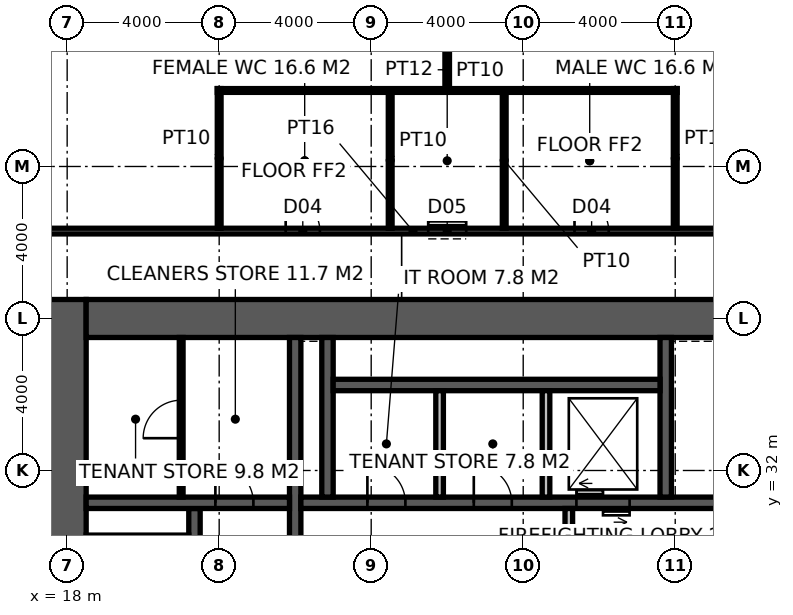
"""IFC4 building model, lengths in metres.
Left out: names, types, materials, properties, quantities, classifications, styles, units other than length and angle.
Written with IfcOpenShell. Run it as: python <this file> out.ifc"""

import sys

from ifc_helpers import new_model, si_unit, direction, frame, frame_2d, origin, place, context, subcontext, project, spatial, rectangle, extrude, element, fill, save


model = new_model("IFC4")
c1 = context("Model", 3, precision=1e-05, world=origin(), true_north=direction((0.0, 1.0)))
c2 = subcontext(c1, "Body", "Model", "MODEL_VIEW")
j1 = project(units=[si_unit("LENGTHUNIT", "METRE"), si_unit("PLANEANGLEUNIT", "RADIAN")], contexts=[c1])
p1 = place(None, origin())
s1 = spatial("IfcSite", under=j1, at=p1, CompositionType="ELEMENT")
p2 = place(p1, origin())
s2 = spatial("IfcBuilding", under=s1, at=p2, CompositionType="ELEMENT")
p3 = place(p2, frame((0.0, 0.0, 298.2)))
s3 = spatial("IfcBuildingStorey", under=s2, at=p3, CompositionType="ELEMENT", Elevation=298.2)
p4 = place(p3, frame((18.0, 17.5, -0.15), z_axis=(0.0, 0.0, 1.0), x_axis=(0.0, 1.0, 0.0)))
e1 = element("IfcWall", 1, at=p4, inside=s3, PredefinedType="SHEAR", context=c2, shape_type="SweptSolid", body=[
    extrude(rectangle(XDim=19.0, YDim=1.0, at=frame_2d((9.5, 0.0))), origin(), (0.0, 0.0, 1.0), 5.85),
])
p5 = place(p3, frame((18.5, 36.0, -0.15), z_axis=(0.0, 0.0, 1.0), x_axis=(1.0, 0.0, 0.0)))
e2 = element("IfcWall", 2, at=p5, inside=s3, PredefinedType="SHEAR", context=c2, shape_type="SweptSolid", body=[
    extrude(rectangle(XDim=17.6, YDim=1.0, at=frame_2d((8.8, 0.0))), origin(), (0.0, 0.0, 1.0), 5.85),
])
p6 = place(p3, frame((24.0, 18.5, -0.15), z_axis=(0.0, 0.0, 1.0), x_axis=(0.0, 1.0, 0.0)))
e3 = element("IfcWall", 3, at=p6, inside=s3, PredefinedType="SHEAR", context=c2, shape_type="SweptSolid", body=[
    extrude(rectangle(XDim=17.0, YDim=0.3, at=frame_2d((8.5, 0.0))), origin(), (0.0, 0.0, 1.0), 5.85),
])
p7 = place(p6, frame((9.6, 0.0, 0.15)))
e4 = element("IfcOpeningElement", 4, at=p7, cuts=e3, PredefinedType="OPENING", context=c2, shape_type="SweptSolid", body=[
    extrude(rectangle(XDim=1.5, YDim=2.4, at=frame_2d((0.75, 1.2))), frame((0.0, 0.16, 0.0), z_axis=(0.0, -1.0, 0.0), x_axis=(1.0, 0.0, 0.0)), (0.0, 0.0, 1.0), 0.32),
])
p8 = place(p3, frame((24.15, 31.15, -0.15), z_axis=(0.0, 0.0, 1.0), x_axis=(1.0, 0.0, 0.0)))
e5 = element("IfcWall", 5, at=p8, inside=s3, PredefinedType="SHEAR", context=c2, shape_type="SweptSolid", body=[
    extrude(rectangle(XDim=11.25, YDim=0.3, at=frame_2d((5.625, 0.0))), origin(), (0.0, 0.0, 1.0), 5.85),
])
p9 = place(p8, frame((1.75, 0.0, 0.15)))
e6 = element("IfcOpeningElement", 6, at=p9, cuts=e5, PredefinedType="OPENING", context=c2, shape_type="SweptSolid", body=[
    extrude(rectangle(XDim=1.0, YDim=2.2, at=frame_2d((0.5, 1.1))), frame((0.0, 0.16, 0.0), z_axis=(0.0, -1.0, 0.0), x_axis=(1.0, 0.0, 0.0)), (0.0, 0.0, 1.0), 0.32),
])
p10 = place(p8, frame((4.55, 0.0, 0.15)))
e7 = element("IfcOpeningElement", 7, at=p10, cuts=e5, PredefinedType="OPENING", context=c2, shape_type="SweptSolid", body=[
    extrude(rectangle(XDim=1.0, YDim=2.2, at=frame_2d((0.5, 1.1))), frame((0.0, 0.16, 0.0), z_axis=(0.0, -1.0, 0.0), x_axis=(1.0, 0.0, 0.0)), (0.0, 0.0, 1.0), 0.32),
])
p11 = place(p8, frame((7.25, 0.0, 0.15)))
e8 = element("IfcOpeningElement", 8, at=p11, cuts=e5, PredefinedType="OPENING", context=c2, shape_type="SweptSolid", body=[
    extrude(rectangle(XDim=1.4, YDim=2.4, at=frame_2d((0.7, 1.2))), frame((0.0, 0.16, 0.0), z_axis=(0.0, -1.0, 0.0), x_axis=(1.0, 0.0, 0.0)), (0.0, 0.0, 1.0), 0.32),
])
p12 = place(p3, frame((21.35, 18.5, -0.15), z_axis=(0.0, 0.0, 1.0), x_axis=(0.0, 1.0, 0.0)))
e9 = element("IfcWall", 9, at=p12, inside=s3, PredefinedType="SHEAR", context=c2, shape_type="SweptSolid", body=[
    extrude(rectangle(XDim=12.5, YDim=0.3, at=frame_2d((6.25, 0.0))), origin(), (0.0, 0.0, 1.0), 5.85),
])
p13 = place(p12, frame((0.875, 0.0, 0.15)))
e10 = element("IfcOpeningElement", 10, at=p13, cuts=e9, PredefinedType="OPENING", context=c2, shape_type="SweptSolid", body=[
    extrude(rectangle(XDim=1.1, YDim=2.2, at=frame_2d((0.55, 1.1))), frame((0.0, 0.16, 0.0), z_axis=(0.0, -1.0, 0.0), x_axis=(1.0, 0.0, 0.0)), (0.0, 0.0, 1.0), 0.32),
])
p14 = place(p12, frame((3.825, 0.0, 0.15)))
e11 = element("IfcOpeningElement", 11, at=p14, cuts=e9, PredefinedType="OPENING", context=c2, shape_type="SweptSolid", body=[
    extrude(rectangle(XDim=1.1, YDim=2.2, at=frame_2d((0.55, 1.1))), frame((0.0, 0.16, 0.0), z_axis=(0.0, -1.0, 0.0), x_axis=(1.0, 0.0, 0.0)), (0.0, 0.0, 1.0), 0.32),
])
p15 = place(p12, frame((6.675, 0.0, 0.15)))
e12 = element("IfcOpeningElement", 12, at=p15, cuts=e9, PredefinedType="OPENING", context=c2, shape_type="SweptSolid", body=[
    extrude(rectangle(XDim=1.1, YDim=2.2, at=frame_2d((0.55, 1.1))), frame((0.0, 0.16, 0.0), z_axis=(0.0, -1.0, 0.0), x_axis=(1.0, 0.0, 0.0)), (0.0, 0.0, 1.0), 0.32),
])
p16 = place(p12, frame((9.575, 0.0, 0.15)))
e13 = element("IfcOpeningElement", 13, at=p16, cuts=e9, PredefinedType="OPENING", context=c2, shape_type="SweptSolid", body=[
    extrude(rectangle(XDim=1.1, YDim=2.2, at=frame_2d((0.55, 1.1))), frame((0.0, 0.16, 0.0), z_axis=(0.0, -1.0, 0.0), x_axis=(1.0, 0.0, 0.0)), (0.0, 0.0, 1.0), 0.32),
])
p17 = place(p3, frame((18.5, 31.15, -0.15), z_axis=(0.0, 0.0, 1.0), x_axis=(1.0, 0.0, 0.0)))
e14 = element("IfcWall", 14, at=p17, inside=s3, PredefinedType="SHEAR", context=c2, shape_type="SweptSolid", body=[
    extrude(rectangle(XDim=5.35, YDim=0.3, at=frame_2d((2.675, 0.0))), origin(), (0.0, 0.0, 1.0), 5.85),
])
p18 = place(p17, frame((3.4, 0.0, 0.15)))
e15 = element("IfcOpeningElement", 15, at=p18, cuts=e14, PredefinedType="OPENING", context=c2, shape_type="SweptSolid", body=[
    extrude(rectangle(XDim=1.0, YDim=2.2, at=frame_2d((0.5, 1.1))), frame((0.0, 0.16, 0.0), z_axis=(0.0, -1.0, 0.0), x_axis=(1.0, 0.0, 0.0)), (0.0, 0.0, 1.0), 0.32),
])
for number, where, z_axis, x_axis in (
    (16, (24.85, 31.3, -0.15), (0.0, 0.0, 1.0), (0.0, 1.0, 0.0)),
    (17, (33.75, 31.3, -0.15), (0.0, 0.0, 1.0), (0.0, 1.0, 0.0)),
):
    element("IfcWall", number, at=place(p3, frame(where, z_axis=z_axis, x_axis=x_axis)), inside=s3, PredefinedType="SHEAR", context=c2, shape_type="SweptSolid", body=[
        extrude(rectangle(XDim=4.2, YDim=0.3, at=frame_2d((2.1, 0.0))), origin(), (0.0, 0.0, 1.0), 5.85),
    ])
p19 = place(p3, frame((25.0, 34.25, -0.15), z_axis=(0.0, 0.0, 1.0), x_axis=(1.0, 0.0, 0.0)))
e18 = element("IfcWall", 18, at=p19, inside=s3, PredefinedType="SHEAR", context=c2, shape_type="SweptSolid", body=[
    extrude(rectangle(XDim=8.6, YDim=0.3, at=frame_2d((4.3, 0.0))), origin(), (0.0, 0.0, 1.0), 5.85),
])
p20 = place(p3, frame((27.8, 31.3, 0.0), z_axis=(0.0, 0.0, 1.0), x_axis=(0.0, 1.0, 0.0)))
e19 = element("IfcWall", 19, at=p20, inside=s3, PredefinedType="SOLIDWALL", context=c2, shape_type="SweptSolid", body=[
    extrude(rectangle(XDim=2.8, YDim=0.2, at=frame_2d((1.4, 0.0))), origin(), (0.0, 0.0, 1.0), 5.7),
])
p21 = place(p3, frame((30.6, 31.3, -0.15), z_axis=(0.0, 0.0, 1.0), x_axis=(0.0, 1.0, 0.0)))
e20 = element("IfcWall", 20, at=p21, inside=s3, PredefinedType="SOLIDWALL", context=c2, shape_type="SweptSolid", body=[
    extrude(rectangle(XDim=2.8, YDim=0.2, at=frame_2d((1.4, 0.0))), origin(), (0.0, 0.0, 1.0), 5.85),
])
p22 = place(p3, frame((31.2, 26.7, 0.0), z_axis=(0.0, 0.0, 1.0), x_axis=(0.0, 1.0, 0.0)))
e21 = element("IfcWall", 21, at=p22, inside=s3, PredefinedType="SOLIDWALL", context=c2, shape_type="SweptSolid", body=[
    extrude(rectangle(XDim=4.3, YDim=0.2, at=frame_2d((2.15, 0.0))), origin(), (0.0, 0.0, 1.0), 5.7),
])
p23 = place(p3, frame((21.0, 31.3, 0.0), z_axis=(0.0, 0.0, 1.0), x_axis=(0.0, 1.0, 0.0)))
e22 = element("IfcWall", 22, at=p23, inside=s3, PredefinedType="PARTITIONING", context=c2, shape_type="SweptSolid", body=[
    extrude(rectangle(XDim=4.2, YDim=0.1, at=frame_2d((2.1, 0.0))), origin(), (0.0, 0.0, 1.0), 5.7),
])
p24 = place(p23, frame((1.55, 0.0, 0.0)))
e23 = element("IfcOpeningElement", 23, at=p24, cuts=e22, PredefinedType="OPENING", context=c2, shape_type="SweptSolid", body=[
    extrude(rectangle(XDim=1.0, YDim=2.2, at=frame_2d((0.5, 1.1))), frame((0.0, 0.06, 0.0), z_axis=(0.0, -1.0, 0.0), x_axis=(1.0, 0.0, 0.0)), (0.0, 0.0, 1.0), 0.12),
])
p25 = place(p3, frame((15.775, 38.3, 0.0), z_axis=(0.0, 0.0, 1.0), x_axis=(1.0, 0.0, 0.0)))
e24 = element("IfcWall", 24, at=p25, inside=s3, PredefinedType="PARTITIONING", context=c2, shape_type="SweptSolid", body=[
    extrude(rectangle(XDim=22.65, YDim=0.15, at=frame_2d((11.325, 0.0))), origin(), (0.0, 0.0, 1.0), 5.7),
])
p26 = place(p25, frame((7.975, 0.0, 0.0)))
e25 = element("IfcOpeningElement", 25, at=p26, cuts=e24, PredefinedType="OPENING", context=c2, shape_type="SweptSolid", body=[
    extrude(rectangle(XDim=0.9, YDim=2.1, at=frame_2d((0.45, 1.05))), frame((0.0, 0.085, 0.0), z_axis=(0.0, -1.0, 0.0), x_axis=(1.0, 0.0, 0.0)), (0.0, 0.0, 1.0), 0.17),
])
p27 = place(p25, frame((11.725, 0.0, 0.0)))
e26 = element("IfcOpeningElement", 26, at=p27, cuts=e24, PredefinedType="OPENING", context=c2, shape_type="SweptSolid", body=[
    extrude(rectangle(XDim=1.0, YDim=2.1, at=frame_2d((0.5, 1.05))), frame((0.0, 0.085, 0.0), z_axis=(0.0, -1.0, 0.0), x_axis=(1.0, 0.0, 0.0)), (0.0, 0.0, 1.0), 0.17),
])
p28 = place(p25, frame((15.575, 0.0, 0.0)))
e27 = element("IfcOpeningElement", 27, at=p28, cuts=e24, PredefinedType="OPENING", context=c2, shape_type="SweptSolid", body=[
    extrude(rectangle(XDim=0.9, YDim=2.1, at=frame_2d((0.45, 1.05))), frame((0.0, 0.085, 0.0), z_axis=(0.0, -1.0, 0.0), x_axis=(1.0, 0.0, 0.0)), (0.0, 0.0, 1.0), 0.17),
])
for number, where, z_axis, x_axis in (
    (28, (22.0, 38.375, 0.0), (0.0, 0.0, 1.0), (0.0, 1.0, 0.0)),
    (29, (34.0, 38.375, 0.0), (0.0, 0.0, 1.0), (0.0, 1.0, 0.0)),
):
    element("IfcWall", number, at=place(p3, frame(where, z_axis=z_axis, x_axis=x_axis)), inside=s3, PredefinedType="PARTITIONING", context=c2, shape_type="SweptSolid", body=[
        extrude(rectangle(XDim=3.675, YDim=0.1, at=frame_2d((1.837, 0.0))), origin(), (0.0, 0.0, 1.0), 4.8),
    ])
p29 = place(p3, frame((21.95, 42.0, 0.0), z_axis=(0.0, 0.0, 1.0), x_axis=(1.0, 0.0, 0.0)))
e30 = element("IfcWall", 30, at=p29, inside=s3, PredefinedType="PARTITIONING", context=c2, shape_type="SweptSolid", body=[
    extrude(rectangle(XDim=12.1, YDim=0.1, at=frame_2d((6.05, 0.0))), origin(), (0.0, 0.0, 1.0), 5.7),
])
for number, where, z_axis, x_axis in (
    (31, (26.5, 38.375, 0.0), (0.0, 0.0, 1.0), (0.0, 1.0, 0.0)),
    (32, (29.5, 38.375, 0.0), (0.0, 0.0, 1.0), (0.0, 1.0, 0.0)),
):
    element("IfcWall", number, at=place(p3, frame(where, z_axis=z_axis, x_axis=x_axis)), inside=s3, PredefinedType="PARTITIONING", context=c2, shape_type="SweptSolid", body=[
        extrude(rectangle(XDim=3.575, YDim=0.1, at=frame_2d((1.788, 0.0))), origin(), (0.0, 0.0, 1.0), 5.7),
    ])
p30 = place(p3, frame((28.0, 42.05, 0.0), z_axis=(0.0, 0.0, 1.0), x_axis=(0.0, 1.0, 0.0)))
e33 = element("IfcWall", 33, at=p30, inside=s3, PredefinedType="PARTITIONING", context=c2, shape_type="SweptSolid", body=[
    extrude(rectangle(XDim=1.65, YDim=0.12, at=frame_2d((0.825, 0.0))), origin(), (0.0, 0.0, 1.0), 5.7),
])
p31 = place(p18, origin())
e34 = element("IfcDoor", 34, at=p31, inside=s3, OperationType="SINGLE_SWING_LEFT", PredefinedType="DOOR", context=c2, shape_type="SweptSolid", body=[
    extrude(rectangle(XDim=1.0, YDim=2.2, at=frame_2d((0.5, 1.1))), frame((0.0, 0.025, 0.0), z_axis=(0.0, -1.0, 0.0), x_axis=(1.0, 0.0, 0.0)), (0.0, 0.0, 1.0), 0.05),
])
fill(e15, e34)
p32 = place(p24, origin())
e35 = element("IfcDoor", 35, at=p32, inside=s3, OperationType="SINGLE_SWING_LEFT", PredefinedType="DOOR", context=c2, shape_type="SweptSolid", body=[
    extrude(rectangle(XDim=1.0, YDim=2.2, at=frame_2d((0.5, 1.1))), frame((0.0, 0.025, 0.0), z_axis=(0.0, -1.0, 0.0), x_axis=(1.0, 0.0, 0.0)), (0.0, 0.0, 1.0), 0.05),
])
fill(e23, e35)
p33 = place(p9, origin())
e36 = element("IfcDoor", 36, at=p33, inside=s3, OperationType="SINGLE_SWING_LEFT", PredefinedType="DOOR", context=c2, shape_type="SweptSolid", body=[
    extrude(rectangle(XDim=1.0, YDim=2.2, at=frame_2d((0.5, 1.1))), frame((0.0, 0.025, 0.0), z_axis=(0.0, -1.0, 0.0), x_axis=(1.0, 0.0, 0.0)), (0.0, 0.0, 1.0), 0.05),
])
fill(e6, e36)
p34 = place(p10, origin())
e37 = element("IfcDoor", 37, at=p34, inside=s3, OperationType="SINGLE_SWING_LEFT", PredefinedType="DOOR", context=c2, shape_type="SweptSolid", body=[
    extrude(rectangle(XDim=1.0, YDim=2.2, at=frame_2d((0.5, 1.1))), frame((0.0, 0.025, 0.0), z_axis=(0.0, -1.0, 0.0), x_axis=(1.0, 0.0, 0.0)), (0.0, 0.0, 1.0), 0.05),
])
fill(e7, e37)
p35 = place(p26, origin())
e38 = element("IfcDoor", 38, at=p35, inside=s3, OperationType="SINGLE_SWING_LEFT", PredefinedType="DOOR", context=c2, shape_type="SweptSolid", body=[
    extrude(rectangle(XDim=0.9, YDim=2.1, at=frame_2d((0.45, 1.05))), frame((0.0, 0.025, 0.0), z_axis=(0.0, -1.0, 0.0), x_axis=(1.0, 0.0, 0.0)), (0.0, 0.0, 1.0), 0.05),
])
fill(e25, e38)
p36 = place(p27, origin())
e39 = element("IfcDoor", 39, at=p36, inside=s3, OperationType="SLIDING_TO_LEFT", PredefinedType="DOOR", context=c2, shape_type="SweptSolid", body=[
    extrude(rectangle(XDim=1.0, YDim=2.1, at=frame_2d((0.5, 1.05))), frame((0.0, 0.025, 0.0), z_axis=(0.0, -1.0, 0.0), x_axis=(1.0, 0.0, 0.0)), (0.0, 0.0, 1.0), 0.05),
])
fill(e26, e39)
p37 = place(p28, origin())
e40 = element("IfcDoor", 40, at=p37, inside=s3, OperationType="SINGLE_SWING_LEFT", PredefinedType="DOOR", context=c2, shape_type="SweptSolid", body=[
    extrude(rectangle(XDim=0.9, YDim=2.1, at=frame_2d((0.45, 1.05))), frame((0.0, 0.025, 0.0), z_axis=(0.0, -1.0, 0.0), x_axis=(1.0, 0.0, 0.0)), (0.0, 0.0, 1.0), 0.05),
])
fill(e27, e40)
p38 = place(p11, origin())
e41 = element("IfcDoor", 41, at=p38, inside=s3, OperationType="DOUBLE_DOOR_SLIDING", PredefinedType="DOOR", context=c2, shape_type="SweptSolid", body=[
    extrude(rectangle(XDim=1.4, YDim=2.4, at=frame_2d((0.7, 1.2))), frame((0.0, 0.025, 0.0), z_axis=(0.0, -1.0, 0.0), x_axis=(1.0, 0.0, 0.0)), (0.0, 0.0, 1.0), 0.05),
])
fill(e8, e41)
save(model, sys.argv[1])
